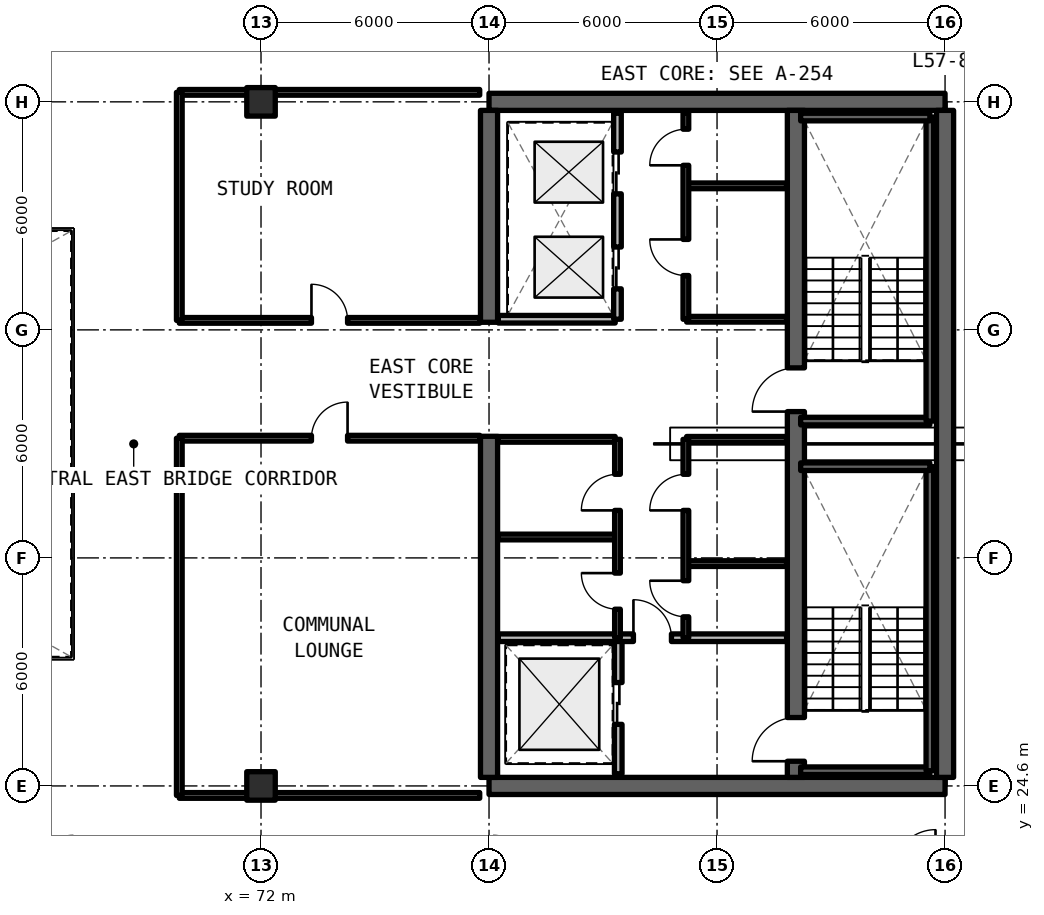
"""IFC4 building model, lengths in metres.
Left out: names, types, materials, properties, quantities, classifications, styles, units other than length and angle.
Written with IfcOpenShell. Run it as: python <this file> out.ifc"""

import sys

from ifc_helpers import new_model, si_unit, direction, frame, frame_2d, origin, origin_2d, place, context, subcontext, project, spatial, rectangle, extrude, element, fill, save


model = new_model("IFC4")
c1 = context("Model", 3, precision=1e-05, world=origin(), true_north=direction((0.0, 1.0)))
c2 = subcontext(c1, "Body", "Model", "MODEL_VIEW")
j1 = project(units=[si_unit("LENGTHUNIT", "METRE"), si_unit("PLANEANGLEUNIT", "RADIAN")], contexts=[c1])
p1 = place(None, origin())
s1 = spatial("IfcSite", under=j1, at=p1, CompositionType="ELEMENT")
p2 = place(p1, origin())
s2 = spatial("IfcBuilding", under=s1, at=p2, CompositionType="ELEMENT")
p3 = place(p2, frame((0.0, 0.0, 204.93)))
s3 = spatial("IfcBuildingStorey", under=s2, at=p3, CompositionType="ELEMENT", Elevation=204.93)
for number, where, z_axis, x_axis in (
    (1, (78.0, 24.6, 0.0), (0.0, 0.0, 1.0), (1.0, 0.0, 0.0)),
    (2, (90.0, 42.6, 0.0), (0.0, 0.0, 1.0), (-1.0, 0.0, 0.0)),
):
    element("IfcWall", number, at=place(p3, frame(where, z_axis=z_axis, x_axis=x_axis)), inside=s3, PredefinedType="SHEAR", context=c2, shape_type="SweptSolid", body=[
        extrude(rectangle(XDim=12.0, YDim=0.45, at=frame_2d((6.0, 0.0))), origin(), (0.0, 0.0, 1.0), 3.3),
    ])
p4 = place(p3, frame((90.0, 24.825, 0.0), z_axis=(0.0, 0.0, 1.0), x_axis=(0.0, 1.0, 0.0)))
e3 = element("IfcWall", 3, at=p4, inside=s3, PredefinedType="SHEAR", context=c2, shape_type="SweptSolid", body=[
    extrude(rectangle(XDim=17.55, YDim=0.45, at=frame_2d((8.775, 0.0))), origin(), (0.0, 0.0, 1.0), 3.3),
])
p5 = place(p3, frame((78.0, 24.825, 0.0), z_axis=(0.0, 0.0, 1.0), x_axis=(0.0, 1.0, 0.0)))
e4 = element("IfcWall", 4, at=p5, inside=s3, PredefinedType="SHEAR", context=c2, shape_type="SweptSolid", body=[
    extrude(rectangle(XDim=8.975, YDim=0.45, at=frame_2d((4.488, 0.0))), origin(), (0.0, 0.0, 1.0), 3.3),
])
p6 = place(p3, frame((78.0, 36.8, 0.0), z_axis=(0.0, 0.0, 1.0), x_axis=(0.0, 1.0, 0.0)))
e5 = element("IfcWall", 5, at=p6, inside=s3, PredefinedType="SHEAR", context=c2, shape_type="SweptSolid", body=[
    extrude(rectangle(XDim=5.575, YDim=0.45, at=frame_2d((2.788, 0.0))), origin(), (0.0, 0.0, 1.0), 3.3),
])
p7 = place(p3, frame((86.075, 24.825, 0.0), z_axis=(0.0, 0.0, 1.0), x_axis=(0.0, 1.0, 0.0)))
e6 = element("IfcWall", 6, at=p7, inside=s3, PredefinedType="SHEAR", context=c2, shape_type="SweptSolid", body=[
    extrude(rectangle(XDim=17.55, YDim=0.45, at=frame_2d((8.775, 0.0))), origin(), (0.0, 0.0, 1.0), 3.3),
])
p8 = place(p7, frame((0.425, 0.0, 0.0)))
e7 = element("IfcOpeningElement", 7, at=p8, cuts=e6, PredefinedType="OPENING", context=c2, shape_type="SweptSolid", body=[
    extrude(rectangle(XDim=1.15, YDim=2.15, at=frame_2d((0.575, 1.075))), frame((0.0, 0.235, 0.0), z_axis=(0.0, -1.0, 0.0), x_axis=(1.0, 0.0, 0.0)), (0.0, 0.0, 1.0), 0.47),
])
p9 = place(p7, frame((9.625, 0.0, 0.0)))
e8 = element("IfcOpeningElement", 8, at=p9, cuts=e6, PredefinedType="OPENING", context=c2, shape_type="SweptSolid", body=[
    extrude(rectangle(XDim=1.15, YDim=2.15, at=frame_2d((0.575, 1.075))), frame((0.0, 0.235, 0.0), z_axis=(0.0, -1.0, 0.0), x_axis=(1.0, 0.0, 0.0)), (0.0, 0.0, 1.0), 0.47),
])
for number, where, z_axis, x_axis in (
    (9, (72.0, 24.6, 0.0), (0.0, 0.0, 1.0), (1.0, 0.0, 0.0)),
    (10, (72.0, 42.6, 0.0), (0.0, 0.0, 1.0), (1.0, 0.0, 0.0)),
):
    element("IfcColumn", number, at=place(p3, frame(where, z_axis=z_axis, x_axis=x_axis)), inside=s3, PredefinedType="COLUMN", context=c2, shape_type="SweptSolid", body=[
        extrude(rectangle(XDim=0.75, YDim=0.75, at=origin_2d()), origin(), (0.0, 0.0, 1.0), 3.3),
    ])
p10 = place(p3, frame((81.4, 24.92, 0.0), z_axis=(0.0, 0.0, 1.0), x_axis=(0.0, 1.0, 0.0)))
e11 = element("IfcWall", 11, at=p10, inside=s3, PredefinedType="SOLIDWALL", context=c2, shape_type="SweptSolid", body=[
    extrude(rectangle(XDim=3.58, YDim=0.2, at=frame_2d((1.79, 0.0))), origin(), (0.0, 0.0, 1.0), 2.35),
])
p11 = place(p10, frame((1.3, 0.0, 0.0)))
e12 = element("IfcOpeningElement", 12, at=p11, cuts=e11, PredefinedType="OPENING", context=c2, shape_type="SweptSolid", body=[
    extrude(rectangle(XDim=1.1, YDim=2.2, at=frame_2d((0.55, 1.1))), frame((0.0, 0.11, 0.0), z_axis=(0.0, -1.0, 0.0), x_axis=(1.0, 0.0, 0.0)), (0.0, 0.0, 1.0), 0.22),
])
p12 = place(p3, frame((78.245, 28.5, 0.0), z_axis=(0.0, 0.0, 1.0), x_axis=(1.0, 0.0, 0.0)))
e13 = element("IfcWall", 13, at=p12, inside=s3, PredefinedType="SOLIDWALL", context=c2, shape_type="SweptSolid", body=[
    extrude(rectangle(XDim=7.585, YDim=0.2, at=frame_2d((3.792, 0.0))), origin(), (0.0, 0.0, 1.0), 2.35),
])
p13 = place(p12, frame((3.555, 0.0, 0.0)))
e14 = element("IfcOpeningElement", 14, at=p13, cuts=e13, PredefinedType="OPENING", context=c2, shape_type="SweptSolid", body=[
    extrude(rectangle(XDim=1.0, YDim=2.15, at=frame_2d((0.5, 1.075))), frame((0.0, 0.11, 0.0), z_axis=(0.0, -1.0, 0.0), x_axis=(1.0, 0.0, 0.0)), (0.0, 0.0, 1.0), 0.22),
])
for number, where, z_axis, x_axis in (
    (15, (83.2, 30.45, 0.0), (0.0, 0.0, 1.0), (1.0, 0.0, 0.0)),
    (16, (83.2, 33.72, 0.0), (0.0, 0.0, 1.0), (1.0, 0.0, 0.0)),
):
    element("IfcWall", number, at=place(p3, frame(where, z_axis=z_axis, x_axis=x_axis)), inside=s3, PredefinedType="SOLIDWALL", context=c2, shape_type="SweptSolid", body=[
        extrude(rectangle(XDim=2.63, YDim=0.15, at=frame_2d((1.315, 0.0))), origin(), (0.0, 0.0, 1.0), 2.35),
    ])
p14 = place(p3, frame((83.18, 28.5, 0.0), z_axis=(0.0, 0.0, 1.0), x_axis=(0.0, 1.0, 0.0)))
e17 = element("IfcWall", 17, at=p14, inside=s3, PredefinedType="SOLIDWALL", context=c2, shape_type="SweptSolid", body=[
    extrude(rectangle(XDim=5.22, YDim=0.15, at=frame_2d((2.61, 0.0))), origin(), (0.0, 0.0, 1.0), 2.35),
])
p15 = place(p14, frame((0.55, 0.0, 0.0)))
e18 = element("IfcOpeningElement", 18, at=p15, cuts=e17, PredefinedType="OPENING", context=c2, shape_type="SweptSolid", body=[
    extrude(rectangle(XDim=0.95, YDim=2.15, at=frame_2d((0.475, 1.075))), frame((0.0, 0.085, 0.0), z_axis=(0.0, -1.0, 0.0), x_axis=(1.0, 0.0, 0.0)), (0.0, 0.0, 1.0), 0.17),
])
p16 = place(p14, frame((3.35, 0.0, 0.0)))
e19 = element("IfcOpeningElement", 19, at=p16, cuts=e17, PredefinedType="OPENING", context=c2, shape_type="SweptSolid", body=[
    extrude(rectangle(XDim=0.95, YDim=2.15, at=frame_2d((0.475, 1.075))), frame((0.0, 0.085, 0.0), z_axis=(0.0, -1.0, 0.0), x_axis=(1.0, 0.0, 0.0)), (0.0, 0.0, 1.0), 0.17),
])
for number, where, z_axis, x_axis in (
    (20, (78.245, 31.15, 0.0), (0.0, 0.0, 1.0), (1.0, 0.0, 0.0)),
    (21, (78.245, 33.72, 0.0), (0.0, 0.0, 1.0), (1.0, 0.0, 0.0)),
):
    element("IfcWall", number, at=place(p3, frame(where, z_axis=z_axis, x_axis=x_axis)), inside=s3, PredefinedType="SOLIDWALL", context=c2, shape_type="SweptSolid", body=[
        extrude(rectangle(XDim=3.075, YDim=0.15, at=frame_2d((1.538, 0.0))), origin(), (0.0, 0.0, 1.0), 2.35),
    ])
p17 = place(p3, frame((81.38, 28.5, 0.0), z_axis=(0.0, 0.0, 1.0), x_axis=(0.0, 1.0, 0.0)))
e22 = element("IfcWall", 22, at=p17, inside=s3, PredefinedType="SOLIDWALL", context=c2, shape_type="SweptSolid", body=[
    extrude(rectangle(XDim=5.22, YDim=0.15, at=frame_2d((2.61, 0.0))), origin(), (0.0, 0.0, 1.0), 2.35),
])
p18 = place(p17, frame((0.75, 0.0, 0.0)))
e23 = element("IfcOpeningElement", 23, at=p18, cuts=e22, PredefinedType="OPENING", context=c2, shape_type="SweptSolid", body=[
    extrude(rectangle(XDim=0.95, YDim=2.15, at=frame_2d((0.475, 1.075))), frame((0.0, 0.085, 0.0), z_axis=(0.0, -1.0, 0.0), x_axis=(1.0, 0.0, 0.0)), (0.0, 0.0, 1.0), 0.17),
])
p19 = place(p17, frame((3.35, 0.0, 0.0)))
e24 = element("IfcOpeningElement", 24, at=p19, cuts=e22, PredefinedType="OPENING", context=c2, shape_type="SweptSolid", body=[
    extrude(rectangle(XDim=0.95, YDim=2.15, at=frame_2d((0.475, 1.075))), frame((0.0, 0.085, 0.0), z_axis=(0.0, -1.0, 0.0), x_axis=(1.0, 0.0, 0.0)), (0.0, 0.0, 1.0), 0.17),
])
for number, where, z_axis, x_axis in (
    (25, (83.2, 36.88, 0.0), (0.0, 0.0, 1.0), (1.0, 0.0, 0.0)),
    (26, (83.2, 40.39, 0.0), (0.0, 0.0, 1.0), (1.0, 0.0, 0.0)),
):
    element("IfcWall", number, at=place(p3, frame(where, z_axis=z_axis, x_axis=x_axis)), inside=s3, PredefinedType="SOLIDWALL", context=c2, shape_type="SweptSolid", body=[
        extrude(rectangle(XDim=2.63, YDim=0.15, at=frame_2d((1.315, 0.0))), origin(), (0.0, 0.0, 1.0), 2.35),
    ])
p20 = place(p3, frame((83.18, 36.88, 0.0), z_axis=(0.0, 0.0, 1.0), x_axis=(0.0, 1.0, 0.0)))
e27 = element("IfcWall", 27, at=p20, inside=s3, PredefinedType="SOLIDWALL", context=c2, shape_type="SweptSolid", body=[
    extrude(rectangle(XDim=5.42, YDim=0.15, at=frame_2d((2.71, 0.0))), origin(), (0.0, 0.0, 1.0), 2.35),
])
p21 = place(p20, frame((1.15, 0.0, 0.0)))
e28 = element("IfcOpeningElement", 28, at=p21, cuts=e27, PredefinedType="OPENING", context=c2, shape_type="SweptSolid", body=[
    extrude(rectangle(XDim=0.95, YDim=2.15, at=frame_2d((0.475, 1.075))), frame((0.0, 0.085, 0.0), z_axis=(0.0, -1.0, 0.0), x_axis=(1.0, 0.0, 0.0)), (0.0, 0.0, 1.0), 0.17),
])
p22 = place(p20, frame((4.05, 0.0, 0.0)))
e29 = element("IfcOpeningElement", 29, at=p22, cuts=e27, PredefinedType="OPENING", context=c2, shape_type="SweptSolid", body=[
    extrude(rectangle(XDim=0.95, YDim=2.15, at=frame_2d((0.475, 1.075))), frame((0.0, 0.085, 0.0), z_axis=(0.0, -1.0, 0.0), x_axis=(1.0, 0.0, 0.0)), (0.0, 0.0, 1.0), 0.17),
])
p23 = place(p3, frame((78.245, 36.88, 0.0), z_axis=(0.0, 0.0, 1.0), x_axis=(1.0, 0.0, 0.0)))
e30 = element("IfcWall", 30, at=p23, inside=s3, PredefinedType="SOLIDWALL", context=c2, shape_type="SweptSolid", body=[
    extrude(rectangle(XDim=3.075, YDim=0.2, at=frame_2d((1.538, 0.0))), origin(), (0.0, 0.0, 1.0), 2.35),
])
p24 = place(p3, frame((81.38, 36.88, 0.0), z_axis=(0.0, 0.0, 1.0), x_axis=(0.0, 1.0, 0.0)))
e31 = element("IfcWall", 31, at=p24, inside=s3, PredefinedType="SOLIDWALL", context=c2, shape_type="SweptSolid", body=[
    extrude(rectangle(XDim=5.42, YDim=0.2, at=frame_2d((2.71, 0.0))), origin(), (0.0, 0.0, 1.0), 2.35),
])
p25 = place(p24, frame((0.8, 0.0, 0.0)))
e32 = element("IfcOpeningElement", 32, at=p25, cuts=e31, PredefinedType="OPENING", context=c2, shape_type="SweptSolid", body=[
    extrude(rectangle(XDim=1.1, YDim=2.2, at=frame_2d((0.55, 1.1))), frame((0.0, 0.11, 0.0), z_axis=(0.0, -1.0, 0.0), x_axis=(1.0, 0.0, 0.0)), (0.0, 0.0, 1.0), 0.22),
])
p26 = place(p24, frame((3.3, 0.0, 0.0)))
e33 = element("IfcOpeningElement", 33, at=p26, cuts=e31, PredefinedType="OPENING", context=c2, shape_type="SweptSolid", body=[
    extrude(rectangle(XDim=1.1, YDim=2.2, at=frame_2d((0.55, 1.1))), frame((0.0, 0.11, 0.0), z_axis=(0.0, -1.0, 0.0), x_axis=(1.0, 0.0, 0.0)), (0.0, 0.0, 1.0), 0.22),
])
p27 = place(p3, frame((69.85, 24.35, 0.0), z_axis=(0.0, 0.0, 1.0), x_axis=(1.0, 0.0, 0.0)))
e34 = element("IfcWall", 34, at=p27, inside=s3, PredefinedType="SOLIDWALL", context=c2, shape_type="SweptSolid", body=[
    extrude(rectangle(XDim=7.905, YDim=0.15, at=frame_2d((3.952, 0.0))), origin(), (0.0, 0.0, 1.0), 2.35),
])
p28 = place(p3, frame((69.85, 33.75, 0.0), z_axis=(0.0, 0.0, 1.0), x_axis=(1.0, 0.0, 0.0)))
e35 = element("IfcWall", 35, at=p28, inside=s3, PredefinedType="SOLIDWALL", context=c2, shape_type="SweptSolid", body=[
    extrude(rectangle(XDim=7.905, YDim=0.15, at=frame_2d((3.952, 0.0))), origin(), (0.0, 0.0, 1.0), 2.35),
])
p29 = place(p28, frame((3.478, 0.0, 0.0)))
e36 = element("IfcOpeningElement", 36, at=p29, cuts=e35, PredefinedType="OPENING", context=c2, shape_type="SweptSolid", body=[
    extrude(rectangle(XDim=0.95, YDim=2.15, at=frame_2d((0.475, 1.075))), frame((0.0, 0.085, 0.0), z_axis=(0.0, -1.0, 0.0), x_axis=(1.0, 0.0, 0.0)), (0.0, 0.0, 1.0), 0.17),
])
p30 = place(p3, frame((69.85, 24.35, 0.0), z_axis=(0.0, 0.0, 1.0), x_axis=(0.0, 1.0, 0.0)))
e37 = element("IfcWall", 37, at=p30, inside=s3, PredefinedType="SOLIDWALL", context=c2, shape_type="SweptSolid", body=[
    extrude(rectangle(XDim=9.4, YDim=0.15, at=frame_2d((4.7, 0.0))), origin(), (0.0, 0.0, 1.0), 2.35),
])
p31 = place(p3, frame((69.85, 36.85, 0.0), z_axis=(0.0, 0.0, 1.0), x_axis=(1.0, 0.0, 0.0)))
e38 = element("IfcWall", 38, at=p31, inside=s3, PredefinedType="SOLIDWALL", context=c2, shape_type="SweptSolid", body=[
    extrude(rectangle(XDim=7.905, YDim=0.15, at=frame_2d((3.952, 0.0))), origin(), (0.0, 0.0, 1.0), 2.35),
])
p32 = place(p31, frame((3.478, 0.0, 0.0)))
e39 = element("IfcOpeningElement", 39, at=p32, cuts=e38, PredefinedType="OPENING", context=c2, shape_type="SweptSolid", body=[
    extrude(rectangle(XDim=0.95, YDim=2.15, at=frame_2d((0.475, 1.075))), frame((0.0, 0.085, 0.0), z_axis=(0.0, -1.0, 0.0), x_axis=(1.0, 0.0, 0.0)), (0.0, 0.0, 1.0), 0.17),
])
p33 = place(p3, frame((69.85, 42.85, 0.0), z_axis=(0.0, 0.0, 1.0), x_axis=(1.0, 0.0, 0.0)))
e40 = element("IfcWall", 40, at=p33, inside=s3, PredefinedType="SOLIDWALL", context=c2, shape_type="SweptSolid", body=[
    extrude(rectangle(XDim=7.905, YDim=0.15, at=frame_2d((3.952, 0.0))), origin(), (0.0, 0.0, 1.0), 2.35),
])
p34 = place(p3, frame((69.85, 36.85, 0.0), z_axis=(0.0, 0.0, 1.0), x_axis=(0.0, 1.0, 0.0)))
e41 = element("IfcWall", 41, at=p34, inside=s3, PredefinedType="SOLIDWALL", context=c2, shape_type="SweptSolid", body=[
    extrude(rectangle(XDim=6.0, YDim=0.15, at=frame_2d((3.0, 0.0))), origin(), (0.0, 0.0, 1.0), 2.35),
])
p35 = place(p3, frame((86.2, 25.0, 0.0), z_axis=(0.0, 0.0, 1.0), x_axis=(1.0, 0.0, 0.0)))
e42 = element("IfcWall", 42, at=p35, inside=s3, PredefinedType="SOLIDWALL", context=c2, shape_type="SweptSolid", body=[
    extrude(rectangle(XDim=3.4, YDim=0.2, at=frame_2d((1.7, 0.0))), origin(), (0.0, 0.0, 1.0), 3.3),
])
p36 = place(p3, frame((89.6, 25.0, 0.0), z_axis=(0.0, 0.0, 1.0), x_axis=(0.0, 1.0, 0.0)))
e43 = element("IfcWall", 43, at=p36, inside=s3, PredefinedType="SOLIDWALL", context=c2, shape_type="SweptSolid", body=[
    extrude(rectangle(XDim=8.0, YDim=0.2, at=frame_2d((4.0, 0.0))), origin(), (0.0, 0.0, 1.0), 3.3),
])
for number, where, z_axis, x_axis in (
    (44, (89.6, 33.0, 0.0), (0.0, 0.0, 1.0), (-1.0, 0.0, 0.0)),
    (45, (86.2, 34.2, 0.0), (0.0, 0.0, 1.0), (1.0, 0.0, 0.0)),
):
    element("IfcWall", number, at=place(p3, frame(where, z_axis=z_axis, x_axis=x_axis)), inside=s3, PredefinedType="SOLIDWALL", context=c2, shape_type="SweptSolid", body=[
        extrude(rectangle(XDim=3.4, YDim=0.2, at=frame_2d((1.7, 0.0))), origin(), (0.0, 0.0, 1.0), 3.3),
    ])
p37 = place(p3, frame((89.6, 34.2, 0.0), z_axis=(0.0, 0.0, 1.0), x_axis=(0.0, 1.0, 0.0)))
e46 = element("IfcWall", 46, at=p37, inside=s3, PredefinedType="SOLIDWALL", context=c2, shape_type="SweptSolid", body=[
    extrude(rectangle(XDim=8.0, YDim=0.2, at=frame_2d((4.0, 0.0))), origin(), (0.0, 0.0, 1.0), 3.3),
])
p38 = place(p3, frame((89.6, 42.2, 0.0), z_axis=(0.0, 0.0, 1.0), x_axis=(-1.0, 0.0, 0.0)))
e47 = element("IfcWall", 47, at=p38, inside=s3, PredefinedType="SOLIDWALL", context=c2, shape_type="SweptSolid", body=[
    extrude(rectangle(XDim=3.4, YDim=0.2, at=frame_2d((1.7, 0.0))), origin(), (0.0, 0.0, 1.0), 3.3),
])
p39 = place(p11, origin())
e48 = element("IfcDoor", 48, at=p39, inside=s3, OperationType="SLIDING_TO_LEFT", PredefinedType="DOOR", context=c2, shape_type="SweptSolid", body=[
    extrude(rectangle(XDim=1.1, YDim=2.2, at=frame_2d((0.55, 1.1))), frame((0.0, 0.025, 0.0), z_axis=(0.0, -1.0, 0.0), x_axis=(1.0, 0.0, 0.0)), (0.0, 0.0, 1.0), 0.05),
])
fill(e12, e48)
p40 = place(p13, origin())
e49 = element("IfcDoor", 49, at=p40, inside=s3, OperationType="SINGLE_SWING_LEFT", PredefinedType="DOOR", context=c2, shape_type="SweptSolid", body=[
    extrude(rectangle(XDim=1.0, YDim=2.15, at=frame_2d((0.5, 1.075))), frame((0.0, 0.025, 0.0), z_axis=(0.0, -1.0, 0.0), x_axis=(1.0, 0.0, 0.0)), (0.0, 0.0, 1.0), 0.05),
])
fill(e14, e49)
p41 = place(p15, origin())
e50 = element("IfcDoor", 50, at=p41, inside=s3, OperationType="SINGLE_SWING_RIGHT", PredefinedType="DOOR", context=c2, shape_type="SweptSolid", body=[
    extrude(rectangle(XDim=0.95, YDim=2.15, at=frame_2d((0.475, 1.075))), frame((0.0, 0.025, 0.0), z_axis=(0.0, -1.0, 0.0), x_axis=(1.0, 0.0, 0.0)), (0.0, 0.0, 1.0), 0.05),
])
fill(e18, e50)
p42 = place(p16, origin())
e51 = element("IfcDoor", 51, at=p42, inside=s3, OperationType="SINGLE_SWING_LEFT", PredefinedType="DOOR", context=c2, shape_type="SweptSolid", body=[
    extrude(rectangle(XDim=0.95, YDim=2.15, at=frame_2d((0.475, 1.075))), frame((0.0, 0.025, 0.0), z_axis=(0.0, -1.0, 0.0), x_axis=(1.0, 0.0, 0.0)), (0.0, 0.0, 1.0), 0.05),
])
fill(e19, e51)
p43 = place(p18, origin())
e52 = element("IfcDoor", 52, at=p43, inside=s3, OperationType="SINGLE_SWING_RIGHT", PredefinedType="DOOR", context=c2, shape_type="SweptSolid", body=[
    extrude(rectangle(XDim=0.95, YDim=2.15, at=frame_2d((0.475, 1.075))), frame((0.0, 0.025, 0.0), z_axis=(0.0, -1.0, 0.0), x_axis=(1.0, 0.0, 0.0)), (0.0, 0.0, 1.0), 0.05),
])
fill(e23, e52)
p44 = place(p19, origin())
e53 = element("IfcDoor", 53, at=p44, inside=s3, OperationType="SINGLE_SWING_LEFT", PredefinedType="DOOR", context=c2, shape_type="SweptSolid", body=[
    extrude(rectangle(XDim=0.95, YDim=2.15, at=frame_2d((0.475, 1.075))), frame((0.0, 0.025, 0.0), z_axis=(0.0, -1.0, 0.0), x_axis=(1.0, 0.0, 0.0)), (0.0, 0.0, 1.0), 0.05),
])
fill(e24, e53)
p45 = place(p21, origin())
e54 = element("IfcDoor", 54, at=p45, inside=s3, OperationType="SINGLE_SWING_RIGHT", PredefinedType="DOOR", context=c2, shape_type="SweptSolid", body=[
    extrude(rectangle(XDim=0.95, YDim=2.15, at=frame_2d((0.475, 1.075))), frame((0.0, 0.025, 0.0), z_axis=(0.0, -1.0, 0.0), x_axis=(1.0, 0.0, 0.0)), (0.0, 0.0, 1.0), 0.05),
])
fill(e28, e54)
p46 = place(p22, origin())
e55 = element("IfcDoor", 55, at=p46, inside=s3, OperationType="SINGLE_SWING_LEFT", PredefinedType="DOOR", context=c2, shape_type="SweptSolid", body=[
    extrude(rectangle(XDim=0.95, YDim=2.15, at=frame_2d((0.475, 1.075))), frame((0.0, 0.025, 0.0), z_axis=(0.0, -1.0, 0.0), x_axis=(1.0, 0.0, 0.0)), (0.0, 0.0, 1.0), 0.05),
])
fill(e29, e55)
p47 = place(p25, origin())
e56 = element("IfcDoor", 56, at=p47, inside=s3, OperationType="SLIDING_TO_LEFT", PredefinedType="DOOR", context=c2, shape_type="SweptSolid", body=[
    extrude(rectangle(XDim=1.1, YDim=2.2, at=frame_2d((0.55, 1.1))), frame((0.0, 0.025, 0.0), z_axis=(0.0, -1.0, 0.0), x_axis=(1.0, 0.0, 0.0)), (0.0, 0.0, 1.0), 0.05),
])
fill(e32, e56)
p48 = place(p26, origin())
e57 = element("IfcDoor", 57, at=p48, inside=s3, OperationType="SLIDING_TO_RIGHT", PredefinedType="DOOR", context=c2, shape_type="SweptSolid", body=[
    extrude(rectangle(XDim=1.1, YDim=2.2, at=frame_2d((0.55, 1.1))), frame((0.0, 0.025, 0.0), z_axis=(0.0, -1.0, 0.0), x_axis=(1.0, 0.0, 0.0)), (0.0, 0.0, 1.0), 0.05),
])
fill(e33, e57)
p49 = place(p29, origin())
e58 = element("IfcDoor", 58, at=p49, inside=s3, OperationType="SINGLE_SWING_RIGHT", PredefinedType="DOOR", context=c2, shape_type="SweptSolid", body=[
    extrude(rectangle(XDim=0.95, YDim=2.15, at=frame_2d((0.475, 1.075))), frame((0.0, 0.025, 0.0), z_axis=(0.0, -1.0, 0.0), x_axis=(1.0, 0.0, 0.0)), (0.0, 0.0, 1.0), 0.05),
])
fill(e36, e58)
p50 = place(p32, origin())
e59 = element("IfcDoor", 59, at=p50, inside=s3, OperationType="SINGLE_SWING_LEFT", PredefinedType="DOOR", context=c2, shape_type="SweptSolid", body=[
    extrude(rectangle(XDim=0.95, YDim=2.15, at=frame_2d((0.475, 1.075))), frame((0.0, 0.025, 0.0), z_axis=(0.0, -1.0, 0.0), x_axis=(1.0, 0.0, 0.0)), (0.0, 0.0, 1.0), 0.05),
])
fill(e39, e59)
p51 = place(p8, origin())
e60 = element("IfcDoor", 60, at=p51, inside=s3, OperationType="SINGLE_SWING_RIGHT", PredefinedType="DOOR", context=c2, shape_type="SweptSolid", body=[
    extrude(rectangle(XDim=1.15, YDim=2.15, at=frame_2d((0.575, 1.075))), frame((0.0, 0.025, 0.0), z_axis=(0.0, -1.0, 0.0), x_axis=(1.0, 0.0, 0.0)), (0.0, 0.0, 1.0), 0.05),
])
fill(e7, e60)
p52 = place(p9, origin())
e61 = element("IfcDoor", 61, at=p52, inside=s3, OperationType="SINGLE_SWING_LEFT", PredefinedType="DOOR", context=c2, shape_type="SweptSolid", body=[
    extrude(rectangle(XDim=1.15, YDim=2.15, at=frame_2d((0.575, 1.075))), frame((0.0, 0.025, 0.0), z_axis=(0.0, -1.0, 0.0), x_axis=(1.0, 0.0, 0.0)), (0.0, 0.0, 1.0), 0.05),
])
fill(e8, e61)
save(model, sys.argv[1])
